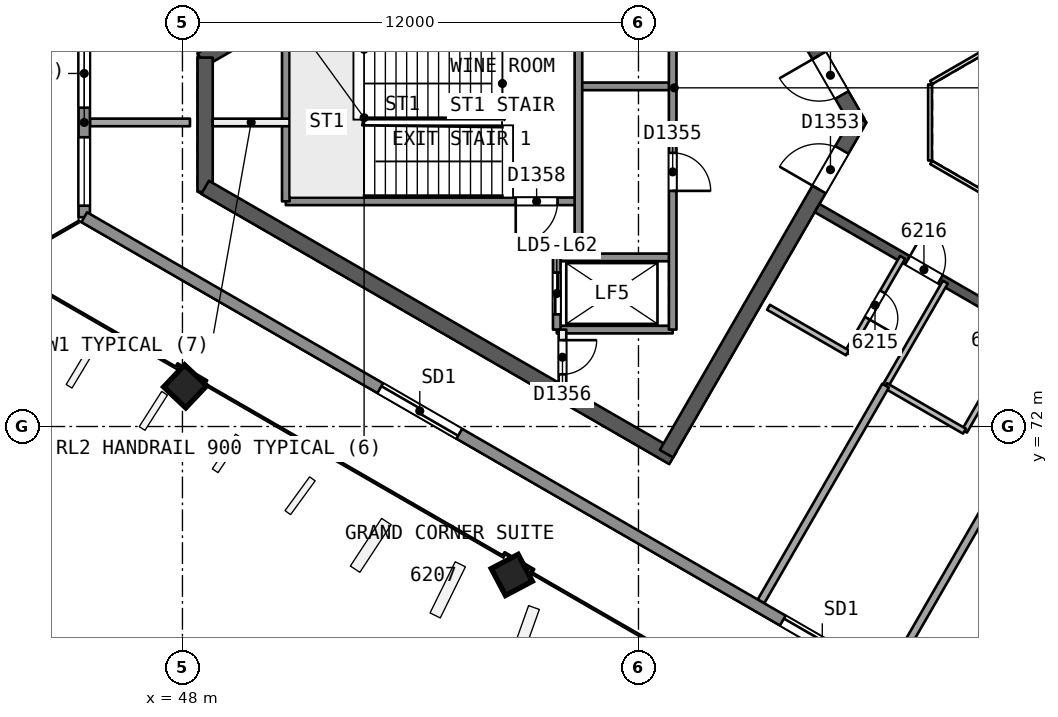
"""IFC4 building model, lengths in metres.
Left out: names, types, materials, properties, quantities, classifications, styles, units other than length and angle.
Written with IfcOpenShell. Run it as: python <this file> out.ifc"""

import sys

from ifc_helpers import new_model, si_unit, direction, frame, frame_2d, origin, origin_2d, place, context, subcontext, project, spatial, rectangle, extrude, element, fill, save


model = new_model("IFC4")
c1 = context("Model", 3, precision=1e-05, world=origin(), true_north=direction((0.0, 1.0)))
c2 = subcontext(c1, "Body", "Model", "MODEL_VIEW")
j1 = project(units=[si_unit("LENGTHUNIT", "METRE"), si_unit("PLANEANGLEUNIT", "RADIAN")], contexts=[c1])
p1 = place(None, origin())
s1 = spatial("IfcSite", under=j1, at=p1, CompositionType="ELEMENT")
p2 = place(p1, origin())
s2 = spatial("IfcBuilding", under=s1, at=p2, CompositionType="ELEMENT")
p3 = place(p2, frame((0.0, 0.0, 255.3)))
s3 = spatial("IfcBuildingStorey", under=s2, at=p3, CompositionType="ELEMENT", Elevation=255.3)
p4 = place(p3, frame((65.769, 80.0, 0.0), z_axis=(0.0, 0.0, 1.0), x_axis=(-0.50000177223, 0.866024380585, 0.0)))
e1 = element("IfcWall", 1, at=p4, inside=s3, PredefinedType="SHEAR", context=c2, shape_type="SweptSolid", body=[
    extrude(rectangle(XDim=10.265, YDim=0.4, at=frame_2d((5.132, 0.0))), origin(), (0.0, 0.0, 1.0), 3.7),
])
p5 = place(p4, frame((0.834, 0.0, 0.0)))
e2 = element("IfcOpeningElement", 2, at=p5, cuts=e1, PredefinedType="OPENING", context=c2, shape_type="SweptSolid", body=[
    extrude(rectangle(XDim=1.2, YDim=2.1, at=frame_2d((0.6, 1.05))), frame((0.0, 0.21, 0.0), z_axis=(0.0, -1.0, 0.0), x_axis=(1.0, 0.0, 0.0)), (0.0, 0.0, 1.0), 0.421),
])
p6 = place(p3, frame((60.737, 88.716, 0.0), z_axis=(0.0, 0.0, 1.0), x_axis=(-0.866028812667, -0.499994095595, 0.0)))
e3 = element("IfcWall", 3, at=p6, inside=s3, PredefinedType="SHEAR", context=c2, shape_type="SweptSolid", body=[
    extrude(rectangle(XDim=14.134, YDim=0.4, at=frame_2d((7.067, 0.0))), origin(), (0.0, 0.0, 1.0), 3.7),
])
p7 = place(p3, frame((48.597, 81.707, 0.0), z_axis=(0.0, 0.0, 1.0), x_axis=(0.0, -1.0, 0.0)))
e4 = element("IfcWall", 4, at=p7, inside=s3, PredefinedType="SHEAR", context=c2, shape_type="SweptSolid", body=[
    extrude(rectangle(XDim=3.53, YDim=0.4, at=frame_2d((1.765, 0.0))), origin(), (0.0, 0.0, 1.0), 3.7),
])
p8 = place(p3, frame((48.597, 78.293, 0.0), z_axis=(0.0, 0.0, 1.0), x_axis=(0.866026024469, -0.499998924941, 0.0)))
e5 = element("IfcWall", 5, at=p8, inside=s3, PredefinedType="SHEAR", context=c2, shape_type="SweptSolid", body=[
    extrude(rectangle(XDim=14.218, YDim=0.4, at=frame_2d((7.109, 0.0))), origin(), (0.0, 0.0, 1.0), 3.7),
])
p9 = place(p3, frame((60.737, 71.284, 0.0), z_axis=(0.0, 0.0, 1.0), x_axis=(0.50000547566, 0.866022242388, 0.0)))
e6 = element("IfcWall", 6, at=p9, inside=s3, PredefinedType="SHEAR", context=c2, shape_type="SweptSolid", body=[
    extrude(rectangle(XDim=10.18, YDim=0.4, at=frame_2d((5.09, 0.0))), origin(), (0.0, 0.0, 1.0), 3.7),
])
p10 = place(p9, frame((8.03, 0.0, 0.0)))
e7 = element("IfcOpeningElement", 7, at=p10, cuts=e6, PredefinedType="OPENING", context=c2, shape_type="SweptSolid", body=[
    extrude(rectangle(XDim=1.2, YDim=2.1, at=frame_2d((0.6, 1.05))), frame((0.0, 0.21, 0.0), z_axis=(0.0, -1.0, 0.0), x_axis=(1.0, 0.0, 0.0)), (0.0, 0.0, 1.0), 0.421),
])
p11 = place(p3, frame((64.7, 77.748, 0.0), z_axis=(0.0, 0.0, 1.0), x_axis=(0.866026492143, -0.499998114903, 0.0)))
e8 = element("IfcWall", 8, at=p11, inside=s3, PredefinedType="SHEAR", context=c2, shape_type="SweptSolid", body=[
    extrude(rectangle(XDim=15.588, YDim=0.25, at=frame_2d((7.794, 0.0))), origin(), (0.0, 0.0, 1.0), 3.3),
])
p12 = place(p11, frame((2.747, 0.0, 0.0)))
e9 = element("IfcOpeningElement", 9, at=p12, cuts=e8, PredefinedType="OPENING", context=c2, shape_type="SweptSolid", body=[
    extrude(rectangle(XDim=1.0, YDim=2.1, at=frame_2d((0.5, 1.05))), frame((0.0, 0.135, 0.0), z_axis=(0.0, -1.0, 0.0), x_axis=(1.0, 0.0, 0.0)), (0.0, 0.0, 1.0), 0.271),
])
p13 = place(p11, frame((6.544, 0.0, 0.0)))
e10 = element("IfcOpeningElement", 10, at=p13, cuts=e8, PredefinedType="OPENING", context=c2, shape_type="SweptSolid", body=[
    extrude(rectangle(XDim=1.0, YDim=2.1, at=frame_2d((0.5, 1.05))), frame((0.0, 0.135, 0.0), z_axis=(0.0, -1.0, 0.0), x_axis=(1.0, 0.0, 0.0)), (0.0, 0.0, 1.0), 0.271),
])
p14 = place(p11, frame((10.441, 0.0, 0.0)))
e11 = element("IfcOpeningElement", 11, at=p14, cuts=e8, PredefinedType="OPENING", context=c2, shape_type="SweptSolid", body=[
    extrude(rectangle(XDim=1.0, YDim=2.1, at=frame_2d((0.5, 1.05))), frame((0.0, 0.135, 0.0), z_axis=(0.0, -1.0, 0.0), x_axis=(1.0, 0.0, 0.0)), (0.0, 0.0, 1.0), 0.271),
])
p15 = place(p11, frame((11.841, 0.0, 0.0)))
e12 = element("IfcOpeningElement", 12, at=p15, cuts=e8, PredefinedType="OPENING", context=c2, shape_type="SweptSolid", body=[
    extrude(rectangle(XDim=1.0, YDim=2.1, at=frame_2d((0.5, 1.05))), frame((0.0, 0.135, 0.0), z_axis=(0.0, -1.0, 0.0), x_axis=(1.0, 0.0, 0.0)), (0.0, 0.0, 1.0), 0.271),
])
p16 = place(p3, frame((48.037, 73.049, 0.0), z_axis=(0.02855911485, 0.006793507689, 0.999569019734), x_axis=(-0.865318766308, 0.500768301983, 0.021319953197)))
e13 = element("IfcColumn", 13, at=p16, inside=s3, PredefinedType="COLUMN", context=c2, shape_type="SweptSolid", body=[
    extrude(rectangle(XDim=0.8, YDim=0.8, at=origin_2d()), origin(), (0.0, 0.0, 1.0), 3.702),
])
p17 = place(p3, frame((56.643, 68.08, 0.0), z_axis=(0.019328516974, 0.012138044789, 0.999739504221), x_axis=(-0.865690909737, 0.500465383244, 0.010660627254)))
e14 = element("IfcColumn", 14, at=p17, inside=s3, PredefinedType="COLUMN", context=c2, shape_type="SweptSolid", body=[
    extrude(rectangle(XDim=0.8, YDim=0.8, at=origin_2d()), origin(), (0.0, 0.0, 1.0), 3.701),
])
p18 = place(p3, frame((45.565, 80.001, 0.0), z_axis=(0.0, 0.0, 1.0), x_axis=(1.0, 0.0, 0.0)))
e15 = element("IfcWall", 15, at=p18, inside=s3, PredefinedType="PARTITIONING", context=c2, shape_type="SweptSolid", body=[
    extrude(rectangle(XDim=2.633, YDim=0.2, at=frame_2d((1.317, 0.0))), origin(), (0.0, 0.0, 1.0), 3.3),
])
p19 = place(p3, frame((66.949, 76.45, 0.0), z_axis=(0.0, 0.0, 1.0), x_axis=(-0.499987231761, -0.866032775405, 0.0)))
e16 = element("IfcWall", 16, at=p19, inside=s3, PredefinedType="PARTITIONING", context=c2, shape_type="SweptSolid", body=[
    extrude(rectangle(XDim=2.9, YDim=0.15, at=frame_2d((1.45, 0.0))), origin(), (0.0, 0.0, 1.0), 3.3),
])
p20 = place(p19, frame((1.05, 0.0, 0.0)))
e17 = element("IfcOpeningElement", 17, at=p20, cuts=e16, PredefinedType="OPENING", context=c2, shape_type="SweptSolid", body=[
    extrude(rectangle(XDim=0.8, YDim=2.1, at=frame_2d((0.4, 1.05))), frame((0.0, 0.085, 0.0), z_axis=(0.0, -1.0, 0.0), x_axis=(1.0, 0.0, 0.0)), (0.0, 0.0, 1.0), 0.171),
])
p21 = place(p3, frame((65.499, 73.938, 0.0), z_axis=(0.0, 0.0, 1.0), x_axis=(-0.866004188936, 0.500036743394, 0.0)))
e18 = element("IfcWall", 18, at=p21, inside=s3, PredefinedType="PARTITIONING", context=c2, shape_type="SweptSolid", body=[
    extrude(rectangle(XDim=2.398, YDim=0.15, at=frame_2d((1.199, 0.0))), origin(), (0.0, 0.0, 1.0), 3.3),
])
p22 = place(p3, frame((63.224, 67.397, 0.0), z_axis=(0.0, 0.0, 1.0), x_axis=(0.499983526171, 0.866034914745, 0.0)))
e19 = element("IfcWall", 19, at=p22, inside=s3, PredefinedType="PARTITIONING", context=c2, shape_type="SweptSolid", body=[
    extrude(rectangle(XDim=6.557, YDim=0.2, at=frame_2d((3.278, 0.0))), origin(), (0.0, 0.0, 1.0), 3.3),
])
p23 = place(p3, frame((66.502, 73.076, 0.0), z_axis=(0.0, 0.0, 1.0), x_axis=(0.499995674689, 0.86602790099, 0.0)))
e20 = element("IfcWall", 20, at=p23, inside=s3, PredefinedType="PARTITIONING", context=c2, shape_type="SweptSolid", body=[
    extrude(rectangle(XDim=3.146, YDim=0.15, at=frame_2d((1.573, 0.0))), origin(), (0.0, 0.0, 1.0), 3.3),
])
p24 = place(p3, frame((70.151, 74.601, 0.0), z_axis=(0.0, 0.0, 1.0), x_axis=(-0.499995674689, -0.86602790099, 0.0)))
e21 = element("IfcWall", 21, at=p24, inside=s3, PredefinedType="PARTITIONING", context=c2, shape_type="SweptSolid", body=[
    extrude(rectangle(XDim=3.146, YDim=0.15, at=frame_2d((1.573, 0.0))), origin(), (0.0, 0.0, 1.0), 3.3),
])
p25 = place(p24, frame((1.173, 0.0, 0.0)))
e22 = element("IfcOpeningElement", 22, at=p25, cuts=e21, PredefinedType="OPENING", context=c2, shape_type="SweptSolid", body=[
    extrude(rectangle(XDim=0.8, YDim=2.1, at=frame_2d((0.4, 1.05))), frame((0.0, 0.085, 0.0), z_axis=(0.0, -1.0, 0.0), x_axis=(1.0, 0.0, 0.0)), (0.0, 0.0, 1.0), 0.171),
])
p26 = place(p3, frame((68.578, 71.877, 0.0), z_axis=(0.0, 0.0, 1.0), x_axis=(-0.866034636017, 0.499984008963, 0.0)))
e23 = element("IfcWall", 23, at=p26, inside=s3, PredefinedType="PARTITIONING", context=c2, shape_type="SweptSolid", body=[
    extrude(rectangle(XDim=2.397, YDim=0.15, at=frame_2d((1.198, 0.0))), origin(), (0.0, 0.0, 1.0), 3.3),
])
p27 = place(p3, frame((66.599, 65.449, 0.0), z_axis=(0.0, 0.0, 1.0), x_axis=(0.499983526171, 0.866034914745, 0.0)))
e24 = element("IfcWall", 24, at=p27, inside=s3, PredefinedType="PARTITIONING", context=c2, shape_type="SweptSolid", body=[
    extrude(rectangle(XDim=6.557, YDim=0.2, at=frame_2d((3.278, 0.0))), origin(), (0.0, 0.0, 1.0), 3.3),
])
p28 = place(p3, frame((45.416, 77.507, 0.0), z_axis=(0.0, 0.0, 1.0), x_axis=(0.0, 1.0, 0.0)))
e25 = element("IfcWall", 25, at=p28, inside=s3, PredefinedType="SOLIDWALL", context=c2, shape_type="SweptSolid", body=[
    extrude(rectangle(XDim=4.987, YDim=0.3, at=frame_2d((2.493, 0.0))), origin(), (0.0, 0.0, 1.0), 3.3),
])
p29 = place(p28, frame((2.883, 0.0, 0.9)))
e26 = element("IfcOpeningElement", 26, at=p29, cuts=e25, PredefinedType="OPENING", context=c2, shape_type="SweptSolid", body=[
    extrude(rectangle(XDim=1.8, YDim=1.5, at=frame_2d((0.9, 0.75))), frame((0.0, 0.161, 0.0), z_axis=(0.0, -1.0, 0.0), x_axis=(1.0, 0.0, 0.0)), (0.0, 0.0, 1.0), 0.321),
])
p30 = place(p28, frame((0.304, 0.0, 0.9)))
e27 = element("IfcOpeningElement", 27, at=p30, cuts=e25, PredefinedType="OPENING", context=c2, shape_type="SweptSolid", body=[
    extrude(rectangle(XDim=1.8, YDim=1.5, at=frame_2d((0.9, 0.75))), frame((0.0, 0.161, 0.0), z_axis=(0.0, -1.0, 0.0), x_axis=(1.0, 0.0, 0.0)), (0.0, 0.0, 1.0), 0.321),
])
p31 = place(p3, frame((87.633, 53.133, 0.0), z_axis=(0.0, 0.0, 1.0), x_axis=(-0.866025373204, 0.500000052967, 0.0)))
e28 = element("IfcWall", 28, at=p31, inside=s3, PredefinedType="SOLIDWALL", context=c2, shape_type="SweptSolid", body=[
    extrude(rectangle(XDim=48.748, YDim=0.3, at=frame_2d((24.374, 0.0))), origin(), (0.0, 0.0, 1.0), 3.3),
])
p32 = place(p31, frame((37.353, 0.0, 0.0)))
e29 = element("IfcOpeningElement", 29, at=p32, cuts=e28, PredefinedType="OPENING", context=c2, shape_type="SweptSolid", body=[
    extrude(rectangle(XDim=2.4, YDim=2.4, at=frame_2d((1.2, 1.2))), frame((0.0, 0.161, 0.0), z_axis=(0.0, -1.0, 0.0), x_axis=(1.0, 0.0, 0.0)), (0.0, 0.0, 1.0), 0.321),
])
p33 = place(p31, frame((8.995, 0.0, 0.0)))
e30 = element("IfcOpeningElement", 30, at=p33, cuts=e28, PredefinedType="OPENING", context=c2, shape_type="SweptSolid", body=[
    extrude(rectangle(XDim=2.4, YDim=2.4, at=frame_2d((1.2, 1.2))), frame((0.0, 0.161, 0.0), z_axis=(0.0, -1.0, 0.0), x_axis=(1.0, 0.0, 0.0)), (0.0, 0.0, 1.0), 0.321),
])
p34 = place(p31, frame((25.123, 0.0, 0.0)))
e31 = element("IfcOpeningElement", 31, at=p34, cuts=e28, PredefinedType="OPENING", context=c2, shape_type="SweptSolid", body=[
    extrude(rectangle(XDim=2.4, YDim=2.4, at=frame_2d((1.2, 1.2))), frame((0.0, 0.161, 0.0), z_axis=(0.0, -1.0, 0.0), x_axis=(1.0, 0.0, 0.0)), (0.0, 0.0, 1.0), 0.321),
])
p35 = place(p31, frame((21.226, 0.0, 0.0)))
e32 = element("IfcOpeningElement", 32, at=p35, cuts=e28, PredefinedType="OPENING", context=c2, shape_type="SweptSolid", body=[
    extrude(rectangle(XDim=2.4, YDim=2.4, at=frame_2d((1.2, 1.2))), frame((0.0, 0.161, 0.0), z_axis=(0.0, -1.0, 0.0), x_axis=(1.0, 0.0, 0.0)), (0.0, 0.0, 1.0), 0.321),
])
p36 = place(p3, frame((60.9, 80.95, 0.0), z_axis=(0.0, 0.0, 1.0), x_axis=(-1.0, 0.0, 0.0)))
e33 = element("IfcWall", 33, at=p36, inside=s3, PredefinedType="SOLIDWALL", context=c2, shape_type="SweptSolid", body=[
    extrude(rectangle(XDim=2.48, YDim=0.2, at=frame_2d((1.24, 0.0))), origin(), (0.0, 0.0, 1.0), 3.3),
])
p37 = place(p3, frame((50.82, 80.0, 0.0), z_axis=(0.0, 0.0, 1.0), x_axis=(-1.0, 0.0, 0.0)))
e34 = element("IfcWall", 34, at=p37, inside=s3, PredefinedType="PARTITIONING", context=c2, shape_type="SweptSolid", body=[
    extrude(rectangle(XDim=2.023, YDim=0.2, at=frame_2d((1.012, 0.0))), origin(), (0.0, 0.0, 1.0), 3.3),
])
p38 = place(p3, frame((58.42, 77.925, 0.0), z_axis=(0.0, 0.0, 1.0), x_axis=(-1.0, 0.0, 0.0)))
e35 = element("IfcWall", 35, at=p38, inside=s3, PredefinedType="SOLIDWALL", context=c2, shape_type="SweptSolid", body=[
    extrude(rectangle(XDim=7.7, YDim=0.2, at=frame_2d((3.85, 0.0))), origin(), (0.0, 0.0, 1.0), 3.3),
])
p39 = place(p38, frame((0.55, 0.0, 0.0)))
e36 = element("IfcOpeningElement", 36, at=p39, cuts=e35, PredefinedType="OPENING", context=c2, shape_type="SweptSolid", body=[
    extrude(rectangle(XDim=1.1, YDim=2.1, at=frame_2d((0.55, 1.05))), frame((0.0, 0.11, 0.0), z_axis=(0.0, -1.0, 0.0), x_axis=(1.0, 0.0, 0.0)), (0.0, 0.0, 1.0), 0.221),
])
for number, where, z_axis, x_axis in (
    (37, (60.9, 76.45, 0.0), (0.0, 0.0, 1.0), (-1.0, 0.0, 0.0)),
    (38, (60.9, 74.55, 0.0), (0.0, 0.0, 1.0), (-1.0, 0.0, 0.0)),
):
    element("IfcWall", number, at=place(p3, frame(where, z_axis=z_axis, x_axis=x_axis)), inside=s3, PredefinedType="SOLIDWALL", context=c2, shape_type="SweptSolid", body=[
        extrude(rectangle(XDim=3.05, YDim=0.2, at=frame_2d((1.525, 0.0))), origin(), (0.0, 0.0, 1.0), 3.3),
    ])
p40 = place(p3, frame((60.9, 85.45, 0.0), z_axis=(0.0, 0.0, 1.0), x_axis=(0.0, -1.0, 0.0)))
e39 = element("IfcWall", 39, at=p40, inside=s3, PredefinedType="SOLIDWALL", context=c2, shape_type="SweptSolid", body=[
    extrude(rectangle(XDim=10.9, YDim=0.2, at=frame_2d((5.45, 0.0))), origin(), (0.0, 0.0, 1.0), 3.3),
])
p41 = place(p40, frame((1.75, 0.0, 0.0)))
e40 = element("IfcOpeningElement", 40, at=p41, cuts=e39, PredefinedType="OPENING", context=c2, shape_type="SweptSolid", body=[
    extrude(rectangle(XDim=1.0, YDim=2.1, at=frame_2d((0.5, 1.05))), frame((0.0, 0.11, 0.0), z_axis=(0.0, -1.0, 0.0), x_axis=(1.0, 0.0, 0.0)), (0.0, 0.0, 1.0), 0.221),
])
p42 = place(p40, frame((6.25, 0.0, 0.0)))
e41 = element("IfcOpeningElement", 41, at=p42, cuts=e39, PredefinedType="OPENING", context=c2, shape_type="SweptSolid", body=[
    extrude(rectangle(XDim=1.0, YDim=2.1, at=frame_2d((0.5, 1.05))), frame((0.0, 0.11, 0.0), z_axis=(0.0, -1.0, 0.0), x_axis=(1.0, 0.0, 0.0)), (0.0, 0.0, 1.0), 0.221),
])
p43 = place(p3, frame((58.42, 87.148, 0.0), z_axis=(0.0, 0.0, 1.0), x_axis=(0.0, -1.0, 0.0)))
e42 = element("IfcWall", 42, at=p43, inside=s3, PredefinedType="SOLIDWALL", context=c2, shape_type="SweptSolid", body=[
    extrude(rectangle(XDim=10.698, YDim=0.2, at=frame_2d((5.349, 0.0))), origin(), (0.0, 0.0, 1.0), 3.3),
])
p44 = place(p43, frame((0.399, 0.0, 0.0)))
e43 = element("IfcOpeningElement", 43, at=p44, cuts=e42, PredefinedType="OPENING", context=c2, shape_type="SweptSolid", body=[
    extrude(rectangle(XDim=0.9, YDim=2.1, at=frame_2d((0.45, 1.05))), frame((0.0, 0.11, 0.0), z_axis=(0.0, -1.0, 0.0), x_axis=(1.0, 0.0, 0.0)), (0.0, 0.0, 1.0), 0.221),
])
p45 = place(p3, frame((58.0, 74.55, 0.0), z_axis=(0.0, 0.0, 1.0), x_axis=(0.0, -1.0, 0.0)))
e44 = element("IfcWall", 44, at=p45, inside=s3, PredefinedType="PARTITIONING", context=c2, shape_type="SweptSolid", body=[
    extrude(rectangle(XDim=1.455, YDim=0.2, at=frame_2d((0.728, 0.0))), origin(), (0.0, 0.0, 1.0), 3.3),
])
p46 = place(p45, frame((0.278, 0.0, 0.0)))
e45 = element("IfcOpeningElement", 45, at=p46, cuts=e44, PredefinedType="OPENING", context=c2, shape_type="SweptSolid", body=[
    extrude(rectangle(XDim=0.9, YDim=2.1, at=frame_2d((0.45, 1.05))), frame((0.0, 0.11, 0.0), z_axis=(0.0, -1.0, 0.0), x_axis=(1.0, 0.0, 0.0)), (0.0, 0.0, 1.0), 0.221),
])
p47 = place(p3, frame((57.85, 76.45, 0.0), z_axis=(0.0, 0.0, 1.0), x_axis=(0.0, -1.0, 0.0)))
e46 = element("IfcWall", 46, at=p47, inside=s3, PredefinedType="SOLIDWALL", context=c2, shape_type="SweptSolid", body=[
    extrude(rectangle(XDim=1.9, YDim=0.2, at=frame_2d((0.95, 0.0))), origin(), (0.0, 0.0, 1.0), 3.3),
])
p48 = place(p47, frame((0.4, 0.0, 0.0)))
e47 = element("IfcOpeningElement", 47, at=p48, cuts=e46, PredefinedType="OPENING", context=c2, shape_type="SweptSolid", body=[
    extrude(rectangle(XDim=1.1, YDim=2.1, at=frame_2d((0.55, 1.05))), frame((0.0, 0.11, 0.0), z_axis=(0.0, -1.0, 0.0), x_axis=(1.0, 0.0, 0.0)), (0.0, 0.0, 1.0), 0.221),
])
p49 = place(p3, frame((50.72, 82.075, 0.0), z_axis=(0.0, 0.0, 1.0), x_axis=(0.0, -1.0, 0.0)))
e48 = element("IfcWall", 48, at=p49, inside=s3, PredefinedType="SOLIDWALL", context=c2, shape_type="SweptSolid", body=[
    extrude(rectangle(XDim=4.15, YDim=0.2, at=frame_2d((2.075, 0.0))), origin(), (0.0, 0.0, 1.0), 3.3),
])
p50 = place(p3, frame((77.738, 86.846, 0.0), z_axis=(0.0, 0.0, 1.0), x_axis=(-0.866026658274, -0.499997827154, 0.0)))
e49 = element("IfcWall", 49, at=p50, inside=s3, PredefinedType="PARTITIONING", context=c2, shape_type="SweptSolid", body=[
    extrude(rectangle(XDim=11.588, YDim=0.1, at=frame_2d((5.794, 0.0))), origin(), (0.0, 0.0, 1.0), 3.3),
])
p51 = place(p3, frame((67.672, 81.0, 0.0), z_axis=(0.0, 0.0, 1.0), x_axis=(0.0, -1.0, 0.0)))
e50 = element("IfcWall", 50, at=p51, inside=s3, PredefinedType="PARTITIONING", context=c2, shape_type="SweptSolid", body=[
    extrude(rectangle(XDim=2.0, YDim=0.1, at=frame_2d((1.0, 0.0))), origin(), (0.0, 0.0, 1.0), 3.3),
])
p52 = place(p3, frame((67.702, 78.948, 0.0), z_axis=(0.0, 0.0, 1.0), x_axis=(0.866026658274, -0.499997827154, 0.0)))
e51 = element("IfcWall", 51, at=p52, inside=s3, PredefinedType="PARTITIONING", context=c2, shape_type="SweptSolid", body=[
    extrude(rectangle(XDim=11.588, YDim=0.1, at=frame_2d((5.794, 0.0))), origin(), (0.0, 0.0, 1.0), 3.3),
])
p53 = place(p20, origin())
e52 = element("IfcDoor", 52, at=p53, inside=s3, OperationType="SINGLE_SWING_RIGHT", PredefinedType="NOTDEFINED", context=c2, shape_type="SweptSolid", body=[
    extrude(rectangle(XDim=0.8, YDim=2.1, at=frame_2d((0.4, 1.05))), frame((0.0, 0.025, 0.0), z_axis=(0.0, -1.0, 0.0), x_axis=(1.0, 0.0, 0.0)), (0.0, 0.0, 1.0), 0.05),
])
fill(e17, e52)
p54 = place(p12, origin())
e53 = element("IfcDoor", 53, at=p54, inside=s3, OperationType="SINGLE_SWING_LEFT", PredefinedType="NOTDEFINED", context=c2, shape_type="SweptSolid", body=[
    extrude(rectangle(XDim=1.0, YDim=2.1, at=frame_2d((0.5, 1.05))), frame((0.0, 0.025, 0.0), z_axis=(0.0, -1.0, 0.0), x_axis=(1.0, 0.0, 0.0)), (0.0, 0.0, 1.0), 0.05),
])
fill(e9, e53)
p55 = place(p29, origin())
e54 = element("IfcWindow", 54, at=p55, inside=s3, PartitioningType="SINGLE_PANEL", PredefinedType="WINDOW", context=c2, shape_type="SweptSolid", body=[
    extrude(rectangle(XDim=1.8, YDim=1.5, at=frame_2d((0.9, 0.75))), frame((0.0, 0.03, 0.0), z_axis=(0.0, -1.0, 0.0), x_axis=(1.0, 0.0, 0.0)), (0.0, 0.0, 1.0), 0.06),
])
fill(e26, e54)
p56 = place(p30, origin())
e55 = element("IfcWindow", 55, at=p56, inside=s3, PartitioningType="SINGLE_PANEL", PredefinedType="WINDOW", context=c2, shape_type="SweptSolid", body=[
    extrude(rectangle(XDim=1.8, YDim=1.5, at=frame_2d((0.9, 0.75))), frame((0.0, 0.03, 0.0), z_axis=(0.0, -1.0, 0.0), x_axis=(1.0, 0.0, 0.0)), (0.0, 0.0, 1.0), 0.06),
])
fill(e27, e55)
p57 = place(p32, origin())
e56 = element("IfcDoor", 56, at=p57, inside=s3, OperationType="SLIDING_TO_LEFT", PredefinedType="NOTDEFINED", context=c2, shape_type="SweptSolid", body=[
    extrude(rectangle(XDim=2.4, YDim=2.4, at=frame_2d((1.2, 1.2))), frame((0.0, 0.025, 0.0), z_axis=(0.0, -1.0, 0.0), x_axis=(1.0, 0.0, 0.0)), (0.0, 0.0, 1.0), 0.05),
])
fill(e29, e56)
p58 = place(p34, origin())
e57 = element("IfcDoor", 57, at=p58, inside=s3, OperationType="SLIDING_TO_LEFT", PredefinedType="NOTDEFINED", context=c2, shape_type="SweptSolid", body=[
    extrude(rectangle(XDim=2.4, YDim=2.4, at=frame_2d((1.2, 1.2))), frame((0.0, 0.025, 0.0), z_axis=(0.0, -1.0, 0.0), x_axis=(1.0, 0.0, 0.0)), (0.0, 0.0, 1.0), 0.05),
])
fill(e31, e57)
p59 = place(p5, origin())
e58 = element("IfcDoor", 58, at=p59, inside=s3, OperationType="SINGLE_SWING_RIGHT", PredefinedType="NOTDEFINED", context=c2, shape_type="SweptSolid", body=[
    extrude(rectangle(XDim=1.2, YDim=2.1, at=frame_2d((0.6, 1.05))), frame((0.0, 0.025, 0.0), z_axis=(0.0, -1.0, 0.0), x_axis=(1.0, 0.0, 0.0)), (0.0, 0.0, 1.0), 0.05),
])
fill(e2, e58)
p60 = place(p10, origin())
e59 = element("IfcDoor", 59, at=p60, inside=s3, OperationType="SINGLE_SWING_LEFT", PredefinedType="NOTDEFINED", context=c2, shape_type="SweptSolid", body=[
    extrude(rectangle(XDim=1.2, YDim=2.1, at=frame_2d((0.6, 1.05))), frame((0.0, 0.025, 0.0), z_axis=(0.0, -1.0, 0.0), x_axis=(1.0, 0.0, 0.0)), (0.0, 0.0, 1.0), 0.05),
])
fill(e7, e59)
p61 = place(p48, origin())
e60 = element("IfcDoor", 60, at=p61, inside=s3, OperationType="SLIDING_TO_RIGHT", PredefinedType="NOTDEFINED", context=c2, shape_type="SweptSolid", body=[
    extrude(rectangle(XDim=1.1, YDim=2.1, at=frame_2d((0.55, 1.05))), frame((0.0, 0.025, 0.0), z_axis=(0.0, -1.0, 0.0), x_axis=(1.0, 0.0, 0.0)), (0.0, 0.0, 1.0), 0.05),
])
fill(e47, e60)
p62 = place(p42, origin())
e61 = element("IfcDoor", 61, at=p62, inside=s3, OperationType="SINGLE_SWING_RIGHT", PredefinedType="NOTDEFINED", context=c2, shape_type="SweptSolid", body=[
    extrude(rectangle(XDim=1.0, YDim=2.1, at=frame_2d((0.5, 1.05))), frame((0.0, 0.025, 0.0), z_axis=(0.0, -1.0, 0.0), x_axis=(1.0, 0.0, 0.0)), (0.0, 0.0, 1.0), 0.05),
])
fill(e41, e61)
p63 = place(p46, origin())
e62 = element("IfcDoor", 62, at=p63, inside=s3, OperationType="SINGLE_SWING_LEFT", PredefinedType="NOTDEFINED", context=c2, shape_type="SweptSolid", body=[
    extrude(rectangle(XDim=0.9, YDim=2.1, at=frame_2d((0.45, 1.05))), frame((0.0, 0.025, 0.0), z_axis=(0.0, -1.0, 0.0), x_axis=(1.0, 0.0, 0.0)), (0.0, 0.0, 1.0), 0.05),
])
fill(e45, e62)
p64 = place(p39, origin())
e63 = element("IfcDoor", 63, at=p64, inside=s3, OperationType="SINGLE_SWING_RIGHT", PredefinedType="NOTDEFINED", context=c2, shape_type="SweptSolid", body=[
    extrude(rectangle(XDim=1.1, YDim=2.1, at=frame_2d((0.55, 1.05))), frame((0.0, 0.025, 0.0), z_axis=(0.0, -1.0, 0.0), x_axis=(1.0, 0.0, 0.0)), (0.0, 0.0, 1.0), 0.05),
])
fill(e36, e63)
save(model, sys.argv[1])
